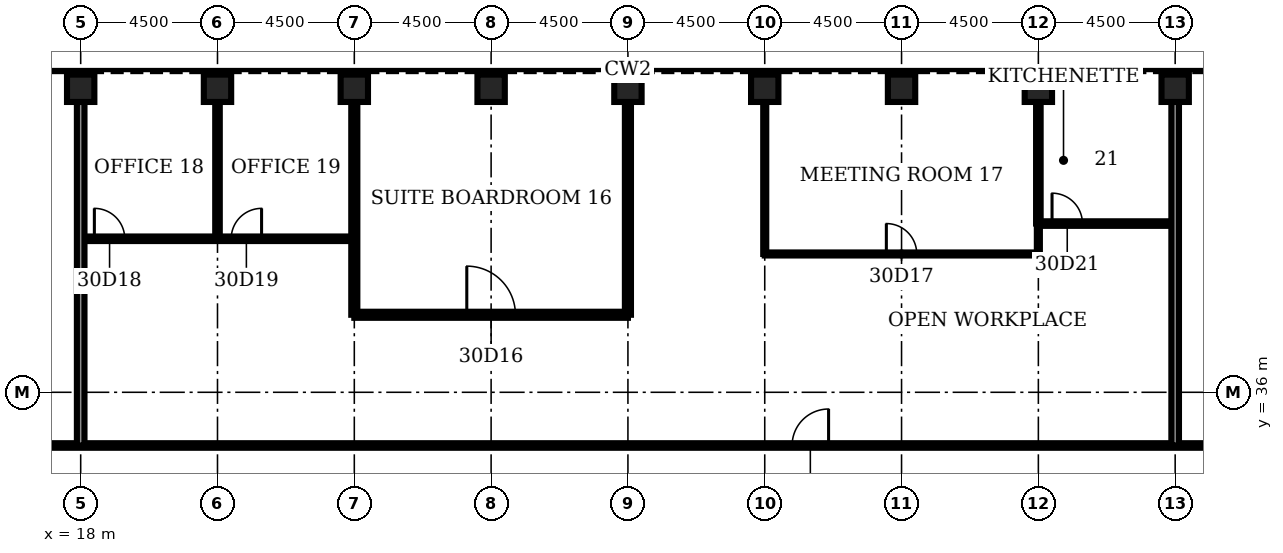
"""IFC4 building model, lengths in metres.
Left out: names, types, materials, properties, quantities, classifications, styles, units other than length and angle.
Written with IfcOpenShell. Run it as: python <this file> out.ifc"""

import sys

from ifc_helpers import new_model, si_unit, direction, frame, frame_2d, origin, origin_2d, place, context, subcontext, project, spatial, rectangle, hollow_rectangle, extrude, element, fill, save


model = new_model("IFC4")
c1 = context("Model", 3, precision=1e-05, world=origin(), true_north=direction((0.0, 1.0)))
c2 = subcontext(c1, "Body", "Model", "MODEL_VIEW")
j1 = project(units=[si_unit("LENGTHUNIT", "METRE"), si_unit("PLANEANGLEUNIT", "RADIAN")], contexts=[c1])
p1 = place(None, origin())
s1 = spatial("IfcSite", under=j1, at=p1, CompositionType="ELEMENT")
p2 = place(p1, origin())
s2 = spatial("IfcBuilding", under=s1, at=p2, CompositionType="ELEMENT")
p3 = place(p2, frame((0.0, 0.0, 138.3)))
s3 = spatial("IfcBuildingStorey", under=s2, at=p3, CompositionType="ELEMENT", Elevation=138.3)
for number, where, z_axis, x_axis in (
    (1, (54.0, 46.0, 0.0), (0.0, 0.0, 1.0), (0.0, 1.0, 0.0)),
    (2, (49.5, 46.0, 0.0), (0.0, 0.0, 1.0), (0.0, 1.0, 0.0)),
    (3, (45.0, 46.0, 0.0), (0.0, 0.0, 1.0), (0.0, 1.0, 0.0)),
    (4, (40.5, 46.0, 0.0), (0.0, 0.0, 1.0), (0.0, 1.0, 0.0)),
    (5, (36.0, 46.0, 0.0), (0.0, 0.0, 1.0), (0.0, 1.0, 0.0)),
    (6, (31.5, 46.0, 0.0), (0.0, 0.0, 1.0), (0.0, 1.0, 0.0)),
    (7, (27.0, 46.0, 0.0), (0.0, 0.0, 1.0), (0.0, 1.0, 0.0)),
    (8, (22.5, 46.0, 0.0), (0.0, 0.0, 1.0), (0.0, 1.0, 0.0)),
    (9, (18.0, 46.0, 0.0), (0.0, 0.0, 1.0), (0.0, 1.0, 0.0)),
):
    element("IfcColumn", number, at=place(p3, frame(where, z_axis=z_axis, x_axis=x_axis)), inside=s3, PredefinedType="COLUMN", context=c2, shape_type="SweptSolid", body=[
        extrude(hollow_rectangle(XDim=0.9, YDim=0.9, WallThickness=0.1, at=origin_2d()), origin(), (0.0, 0.0, 1.0), 4.2),
    ])
p4 = place(p3, frame((15.15, 34.25, 0.0), z_axis=(0.0, 0.0, 1.0), x_axis=(1.0, 0.0, 0.0)))
e10 = element("IfcWall", 10, at=p4, inside=s3, PredefinedType="PARTITIONING", context=c2, shape_type="SweptSolid", body=[
    extrude(rectangle(XDim=41.7, YDim=0.15, at=frame_2d((20.85, 0.0))), origin(), (0.0, 0.0, 1.0), 3.0),
])
p5 = place(p4, frame((26.25, 0.0, 0.0)))
e11 = element("IfcOpeningElement", 11, at=p5, cuts=e10, PredefinedType="OPENING", context=c2, shape_type="SweptSolid", body=[
    extrude(rectangle(XDim=1.2, YDim=2.1, at=frame_2d((0.6, 1.05))), frame((0.0, 0.085, 0.0), z_axis=(0.0, -1.0, 0.0), x_axis=(1.0, 0.0, 0.0)), (0.0, 0.0, 1.0), 0.17),
])
p6 = place(p3, frame((27.0, 38.55, 0.0), z_axis=(0.0, 0.0, 1.0), x_axis=(1.0, 0.0, 0.0)))
e12 = element("IfcWall", 12, at=p6, inside=s3, PredefinedType="PARTITIONING", context=c2, shape_type="SweptSolid", body=[
    extrude(rectangle(XDim=9.0, YDim=0.2, at=frame_2d((4.5, 0.0))), origin(), (0.0, 0.0, 1.0), 3.0),
])
p7 = place(p6, frame((3.7, 0.0, 0.0)))
e13 = element("IfcOpeningElement", 13, at=p7, cuts=e12, PredefinedType="OPENING", context=c2, shape_type="SweptSolid", body=[
    extrude(rectangle(XDim=1.6, YDim=2.1, at=frame_2d((0.8, 1.05))), frame((0.0, 0.11, 0.0), z_axis=(0.0, -1.0, 0.0), x_axis=(1.0, 0.0, 0.0)), (0.0, 0.0, 1.0), 0.22),
])
p8 = place(p3, frame((40.5, 40.55, 0.0), z_axis=(0.0, 0.0, 1.0), x_axis=(1.0, 0.0, 0.0)))
e14 = element("IfcWall", 14, at=p8, inside=s3, PredefinedType="PARTITIONING", context=c2, shape_type="SweptSolid", body=[
    extrude(rectangle(XDim=9.0, YDim=0.1, at=frame_2d((4.5, 0.0))), origin(), (0.0, 0.0, 1.0), 3.0),
])
p9 = place(p8, frame((4.0, 0.0, 0.0)))
e15 = element("IfcOpeningElement", 15, at=p9, cuts=e14, PredefinedType="OPENING", context=c2, shape_type="SweptSolid", body=[
    extrude(rectangle(XDim=1.0, YDim=2.1, at=frame_2d((0.5, 1.05))), frame((0.0, 0.06, 0.0), z_axis=(0.0, -1.0, 0.0), x_axis=(1.0, 0.0, 0.0)), (0.0, 0.0, 1.0), 0.12),
])
p10 = place(p3, frame((18.0, 41.05, 0.0), z_axis=(0.0, 0.0, 1.0), x_axis=(1.0, 0.0, 0.0)))
e16 = element("IfcWall", 16, at=p10, inside=s3, PredefinedType="PARTITIONING", context=c2, shape_type="SweptSolid", body=[
    extrude(rectangle(XDim=9.0, YDim=0.15, at=frame_2d((4.5, 0.0))), origin(), (0.0, 0.0, 1.0), 3.0),
])
p11 = place(p10, frame((0.45, 0.0, 0.0)))
e17 = element("IfcOpeningElement", 17, at=p11, cuts=e16, PredefinedType="OPENING", context=c2, shape_type="SweptSolid", body=[
    extrude(rectangle(XDim=1.0, YDim=2.1, at=frame_2d((0.5, 1.05))), frame((0.0, 0.085, 0.0), z_axis=(0.0, -1.0, 0.0), x_axis=(1.0, 0.0, 0.0)), (0.0, 0.0, 1.0), 0.17),
])
p12 = place(p10, frame((4.95, 0.0, 0.0)))
e18 = element("IfcOpeningElement", 18, at=p12, cuts=e16, PredefinedType="OPENING", context=c2, shape_type="SweptSolid", body=[
    extrude(rectangle(XDim=1.0, YDim=2.1, at=frame_2d((0.5, 1.05))), frame((0.0, 0.085, 0.0), z_axis=(0.0, -1.0, 0.0), x_axis=(1.0, 0.0, 0.0)), (0.0, 0.0, 1.0), 0.17),
])
p13 = place(p3, frame((49.5, 41.55, 0.0), z_axis=(0.0, 0.0, 1.0), x_axis=(1.0, 0.0, 0.0)))
e19 = element("IfcWall", 19, at=p13, inside=s3, PredefinedType="PARTITIONING", context=c2, shape_type="SweptSolid", body=[
    extrude(rectangle(XDim=4.5, YDim=0.15, at=frame_2d((2.25, 0.0))), origin(), (0.0, 0.0, 1.0), 3.0),
])
p14 = place(p13, frame((0.45, 0.0, 0.0)))
e20 = element("IfcOpeningElement", 20, at=p14, cuts=e19, PredefinedType="OPENING", context=c2, shape_type="SweptSolid", body=[
    extrude(rectangle(XDim=1.0, YDim=2.1, at=frame_2d((0.5, 1.05))), frame((0.0, 0.085, 0.0), z_axis=(0.0, -1.0, 0.0), x_axis=(1.0, 0.0, 0.0)), (0.0, 0.0, 1.0), 0.17),
])
p15 = place(p3, frame((18.0, 34.25, 0.0), z_axis=(0.0, 0.0, 1.0), x_axis=(0.0, 1.0, 0.0)))
e21 = element("IfcWall", 21, at=p15, inside=s3, PredefinedType="PARTITIONING", context=c2, shape_type="SweptSolid", body=[
    extrude(rectangle(XDim=11.3, YDim=0.25, at=frame_2d((5.65, 0.0))), origin(), (0.0, 0.0, 1.0), 3.0),
])
p16 = place(p3, frame((22.5, 41.05, 0.0), z_axis=(0.0, 0.0, 1.0), x_axis=(0.0, 1.0, 0.0)))
e22 = element("IfcWall", 22, at=p16, inside=s3, PredefinedType="PARTITIONING", context=c2, shape_type="SweptSolid", body=[
    extrude(rectangle(XDim=4.5, YDim=0.15, at=frame_2d((2.25, 0.0))), origin(), (0.0, 0.0, 1.0), 3.0),
])
for number, where, z_axis, x_axis in (
    (23, (27.0, 38.55, 0.0), (0.0, 0.0, 1.0), (0.0, 1.0, 0.0)),
    (24, (36.0, 38.55, 0.0), (0.0, 0.0, 1.0), (0.0, 1.0, 0.0)),
):
    element("IfcWall", number, at=place(p3, frame(where, z_axis=z_axis, x_axis=x_axis)), inside=s3, PredefinedType="PARTITIONING", context=c2, shape_type="SweptSolid", body=[
        extrude(rectangle(XDim=7.0, YDim=0.2, at=frame_2d((3.5, 0.0))), origin(), (0.0, 0.0, 1.0), 3.0),
    ])
p17 = place(p3, frame((40.5, 40.55, 0.0), z_axis=(0.0, 0.0, 1.0), x_axis=(0.0, 1.0, 0.0)))
e25 = element("IfcWall", 25, at=p17, inside=s3, PredefinedType="PARTITIONING", context=c2, shape_type="SweptSolid", body=[
    extrude(rectangle(XDim=5.0, YDim=0.1, at=frame_2d((2.5, 0.0))), origin(), (0.0, 0.0, 1.0), 3.0),
])
p18 = place(p3, frame((49.5, 40.55, 0.0), z_axis=(0.0, 0.0, 1.0), x_axis=(0.0, 1.0, 0.0)))
e26 = element("IfcWall", 26, at=p18, inside=s3, PredefinedType="PARTITIONING", context=c2, shape_type="SweptSolid", body=[
    extrude(rectangle(XDim=1.0, YDim=0.1, at=frame_2d((0.5, 0.0))), origin(), (0.0, 0.0, 1.0), 3.0),
])
p19 = place(p3, frame((49.5, 41.55, 0.0), z_axis=(0.0, 0.0, 1.0), x_axis=(0.0, 1.0, 0.0)))
e27 = element("IfcWall", 27, at=p19, inside=s3, PredefinedType="PARTITIONING", context=c2, shape_type="SweptSolid", body=[
    extrude(rectangle(XDim=4.0, YDim=0.15, at=frame_2d((2.0, 0.0))), origin(), (0.0, 0.0, 1.0), 3.0),
])
p20 = place(p3, frame((54.0, 34.25, 0.0), z_axis=(0.0, 0.0, 1.0), x_axis=(0.0, 1.0, 0.0)))
e28 = element("IfcWall", 28, at=p20, inside=s3, PredefinedType="PARTITIONING", context=c2, shape_type="SweptSolid", body=[
    extrude(rectangle(XDim=11.3, YDim=0.25, at=frame_2d((5.65, 0.0))), origin(), (0.0, 0.0, 1.0), 3.0),
])
p21 = place(p7, origin())
e29 = element("IfcDoor", 29, at=p21, inside=s3, OperationType="SINGLE_SWING_LEFT", PredefinedType="DOOR", context=c2, shape_type="SweptSolid", body=[
    extrude(rectangle(XDim=1.6, YDim=2.1, at=frame_2d((0.8, 1.05))), frame((0.0, 0.025, 0.0), z_axis=(0.0, -1.0, 0.0), x_axis=(1.0, 0.0, 0.0)), (0.0, 0.0, 1.0), 0.05),
])
fill(e13, e29)
p22 = place(p9, origin())
e30 = element("IfcDoor", 30, at=p22, inside=s3, OperationType="SINGLE_SWING_LEFT", PredefinedType="DOOR", context=c2, shape_type="SweptSolid", body=[
    extrude(rectangle(XDim=1.0, YDim=2.1, at=frame_2d((0.5, 1.05))), frame((0.0, 0.025, 0.0), z_axis=(0.0, -1.0, 0.0), x_axis=(1.0, 0.0, 0.0)), (0.0, 0.0, 1.0), 0.05),
])
fill(e15, e30)
p23 = place(p11, origin())
e31 = element("IfcDoor", 31, at=p23, inside=s3, OperationType="SINGLE_SWING_LEFT", PredefinedType="DOOR", context=c2, shape_type="SweptSolid", body=[
    extrude(rectangle(XDim=1.0, YDim=2.1, at=frame_2d((0.5, 1.05))), frame((0.0, 0.025, 0.0), z_axis=(0.0, -1.0, 0.0), x_axis=(1.0, 0.0, 0.0)), (0.0, 0.0, 1.0), 0.05),
])
fill(e17, e31)
p24 = place(p12, origin())
e32 = element("IfcDoor", 32, at=p24, inside=s3, OperationType="SINGLE_SWING_RIGHT", PredefinedType="DOOR", context=c2, shape_type="SweptSolid", body=[
    extrude(rectangle(XDim=1.0, YDim=2.1, at=frame_2d((0.5, 1.05))), frame((0.0, 0.025, 0.0), z_axis=(0.0, -1.0, 0.0), x_axis=(1.0, 0.0, 0.0)), (0.0, 0.0, 1.0), 0.05),
])
fill(e18, e32)
p25 = place(p14, origin())
e33 = element("IfcDoor", 33, at=p25, inside=s3, OperationType="SINGLE_SWING_LEFT", PredefinedType="DOOR", context=c2, shape_type="SweptSolid", body=[
    extrude(rectangle(XDim=1.0, YDim=2.1, at=frame_2d((0.5, 1.05))), frame((0.0, 0.025, 0.0), z_axis=(0.0, -1.0, 0.0), x_axis=(1.0, 0.0, 0.0)), (0.0, 0.0, 1.0), 0.05),
])
fill(e20, e33)
p26 = place(p5, origin())
e34 = element("IfcDoor", 34, at=p26, inside=s3, OperationType="SINGLE_SWING_RIGHT", PredefinedType="DOOR", context=c2, shape_type="SweptSolid", body=[
    extrude(rectangle(XDim=1.2, YDim=2.1, at=frame_2d((0.6, 1.05))), frame((0.0, 0.025, 0.0), z_axis=(0.0, -1.0, 0.0), x_axis=(1.0, 0.0, 0.0)), (0.0, 0.0, 1.0), 0.05),
])
fill(e11, e34)
save(model, sys.argv[1])
